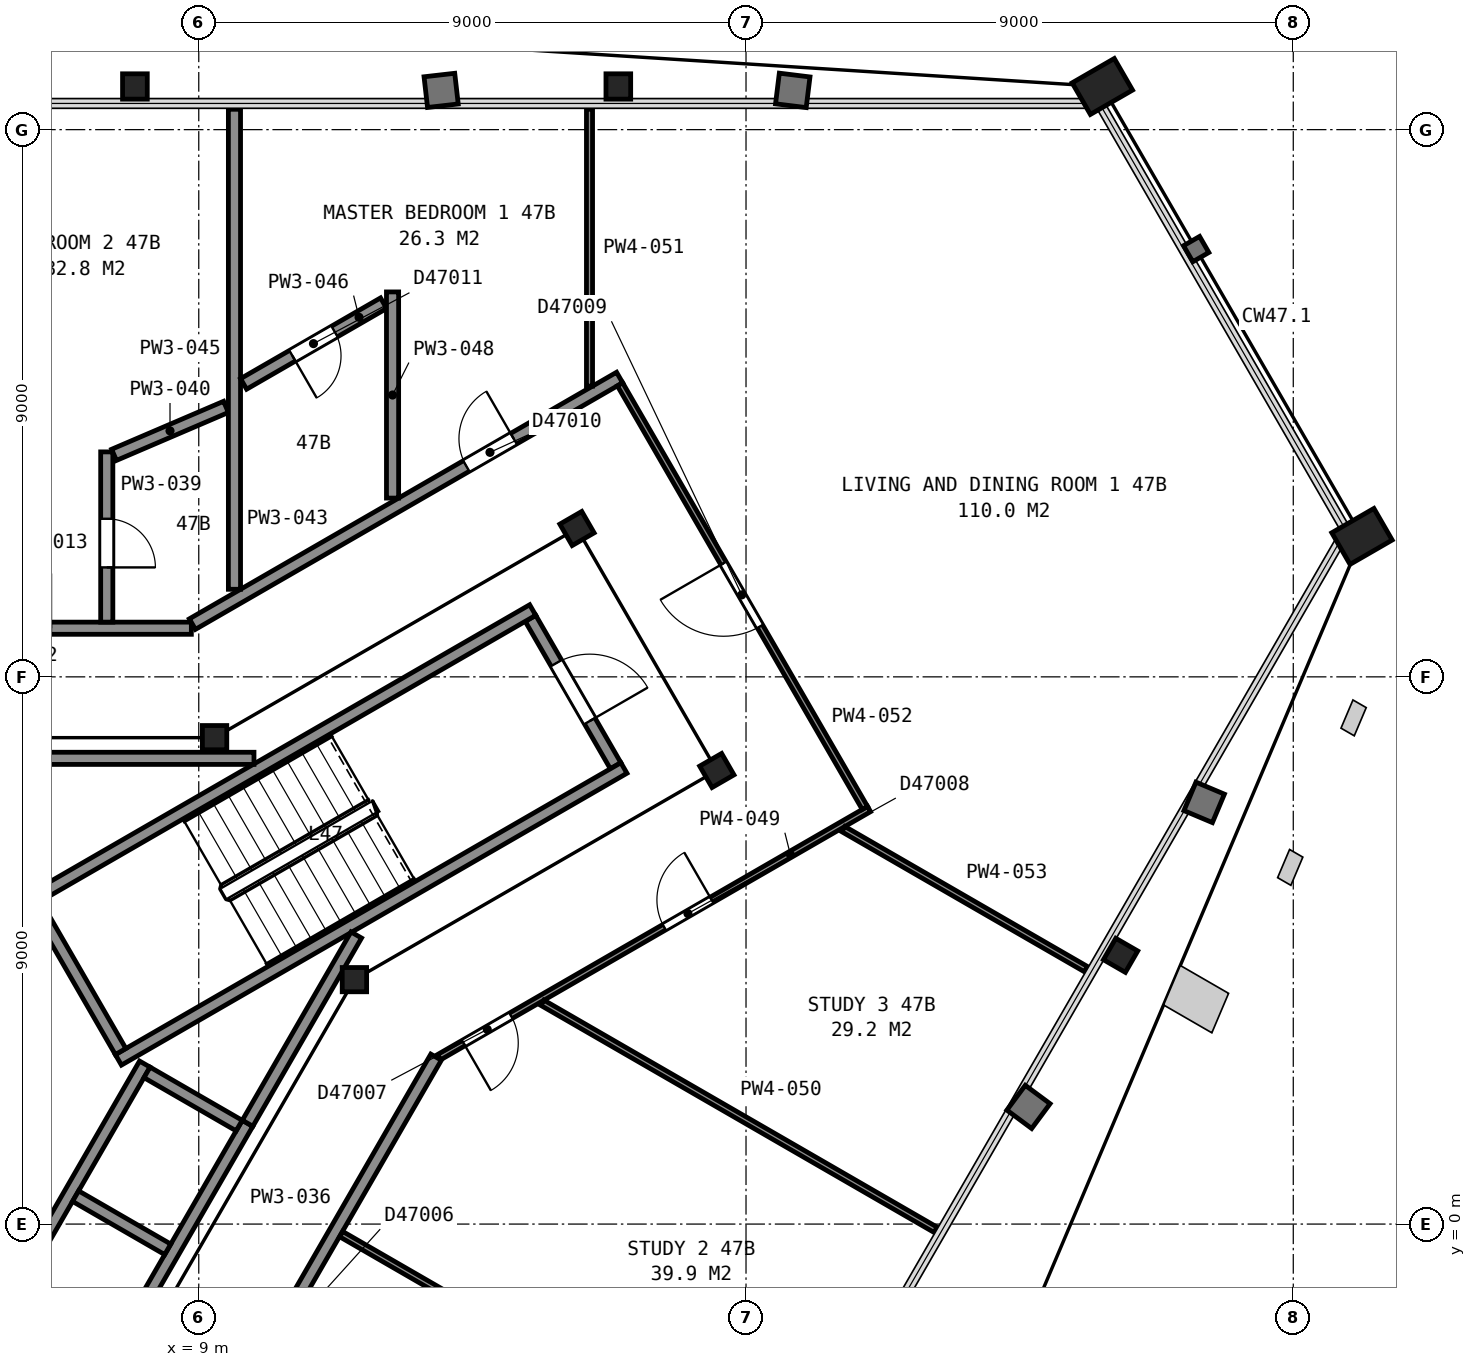
"""IFC4 building model, lengths in metres.
Left out: names, types, materials, properties, quantities, classifications, styles, units other than length and angle.
Written with IfcOpenShell. Run it as: python <this file> out.ifc"""

import sys

from ifc_helpers import new_model, si_unit, direction, frame, frame_2d, origin, origin_2d, place, context, subcontext, project, spatial, rectangle, hollow_rectangle, i_section, extrude, element, fill, save


model = new_model("IFC4")
c1 = context("Model", 3, precision=1e-05, world=origin(), true_north=direction((0.0, 1.0)))
c2 = subcontext(c1, "Body", "Model", "MODEL_VIEW")
j1 = project(units=[si_unit("LENGTHUNIT", "METRE"), si_unit("PLANEANGLEUNIT", "RADIAN")], contexts=[c1])
p1 = place(None, origin())
s1 = spatial("IfcSite", under=j1, at=p1, CompositionType="ELEMENT")
p2 = place(p1, origin())
s2 = spatial("IfcBuilding", under=s1, at=p2, CompositionType="ELEMENT")
p3 = place(p2, frame((0.0, 0.0, 189.5)))
s3 = spatial("IfcBuildingStorey", under=s2, at=p3, CompositionType="ELEMENT", Elevation=189.5)
p4 = place(p3, frame((23.86, 18.71, 0.065), z_axis=(0.0, 0.0, 1.0), x_axis=(0.5, -0.866025403784, 0.0)))
e1 = element("IfcColumn", 1, at=p4, inside=s3, PredefinedType="COLUMN", context=c2, shape_type="SweptSolid", body=[
    extrude(hollow_rectangle(XDim=0.6, YDim=0.8, WallThickness=0.05, at=origin_2d()), origin(), (0.0, 0.0, 1.0), 3.635),
])
p5 = place(p3, frame((15.9, 18.71, 0.04), z_axis=(0.0, 0.0, 1.0), x_axis=(1.0, 0.0, 0.0)))
e2 = element("IfcColumn", 2, at=p5, inside=s3, PredefinedType="COLUMN", context=c2, shape_type="SweptSolid", body=[
    extrude(i_section(OverallWidth=0.406, OverallDepth=0.417, WebThickness=0.03, FlangeThickness=0.048, FilletRadius=0.015, at=origin_2d()), origin(), (0.0, 0.0, 1.0), 3.66),
])
p6 = place(p3, frame((7.95, 18.71, 0.035), z_axis=(0.0, 0.0, 1.0), x_axis=(1.0, 0.0, 0.0)))
e3 = element("IfcColumn", 3, at=p6, inside=s3, PredefinedType="COLUMN", context=c2, shape_type="SweptSolid", body=[
    extrude(i_section(OverallWidth=0.406, OverallDepth=0.417, WebThickness=0.03, FlangeThickness=0.048, FilletRadius=0.015, at=origin_2d()), origin(), (0.0, 0.0, 1.0), 3.665),
])
p7 = place(p3, frame((24.16, 4.42, 0.04), z_axis=(0.0, 0.0, 1.0), x_axis=(-0.5, -0.866025403784, 0.0)))
e4 = element("IfcColumn", 4, at=p7, inside=s3, PredefinedType="COLUMN", context=c2, shape_type="SweptSolid", body=[
    extrude(i_section(OverallWidth=0.406, OverallDepth=0.417, WebThickness=0.03, FlangeThickness=0.048, FilletRadius=0.015, at=origin_2d()), origin(), (0.0, 0.0, 1.0), 3.66),
])
p8 = place(p3, frame((28.13, 11.31, 0.065), z_axis=(0.0, 0.0, 1.0), x_axis=(0.5, -0.866025403784, 0.0)))
e5 = element("IfcColumn", 5, at=p8, inside=s3, PredefinedType="COLUMN", context=c2, shape_type="SweptSolid", body=[
    extrude(hollow_rectangle(XDim=0.6, YDim=0.8, WallThickness=0.05, at=origin_2d()), origin(), (0.0, 0.0, 1.0), 3.635),
])
p9 = place(p3, frame((11.56, 4.02, 0.0), z_axis=(0.0, 0.0, 1.0), x_axis=(1.0, 0.0, 0.0)))
e6 = element("IfcColumn", 6, at=p9, inside=s3, PredefinedType="COLUMN", context=c2, shape_type="SweptSolid", body=[
    extrude(i_section(OverallWidth=0.401, OverallDepth=0.399, WebThickness=0.025, FlangeThickness=0.04, FilletRadius=0.015, at=origin_2d()), origin(), (0.0, 0.0, 1.0), 3.7),
])
for number, where, z_axis, x_axis in (
    (7, (17.52, 7.46, 0.0), (0.0, 0.0, 1.0), (0.5, -0.866, 0.0)),
    (8, (15.22, 11.44, 0.0), (0.0, 0.0, 1.0), (0.5, -0.866, 0.0)),
):
    element("IfcColumn", number, at=place(p3, frame(where, z_axis=z_axis, x_axis=x_axis)), inside=s3, PredefinedType="COLUMN", context=c2, shape_type="SweptSolid", body=[
        extrude(i_section(OverallWidth=0.406, OverallDepth=0.417, WebThickness=0.03, FlangeThickness=0.048, FilletRadius=0.015, at=origin_2d()), origin(), (0.0, 0.0, 1.0), 3.7),
    ])
p10 = place(p3, frame((9.26, 8.0, 0.0), z_axis=(0.0, 0.0, 1.0), x_axis=(1.0, 0.0, 0.0)))
e9 = element("IfcColumn", 9, at=p10, inside=s3, PredefinedType="COLUMN", context=c2, shape_type="SweptSolid", body=[
    extrude(i_section(OverallWidth=0.401, OverallDepth=0.399, WebThickness=0.025, FlangeThickness=0.04, FilletRadius=0.015, at=origin_2d()), origin(), (0.0, 0.0, 1.0), 3.7),
])
p11 = place(p3, frame((15.855, 7.538, 0.0), z_axis=(0.0, 0.0, 1.0), x_axis=(-0.500049511043, 0.865996816683, 0.0)))
e10 = element("IfcWall", 10, at=p11, inside=s3, PredefinedType="PARTITIONING", context=c2, shape_type="SweptSolid", body=[
    extrude(rectangle(XDim=2.8, YDim=0.2, at=frame_2d((1.4, 0.0))), origin(), (0.0, 0.0, 1.0), 3.45),
])
p12 = place(p11, frame((0.85, 0.0, 0.0)))
e11 = element("IfcOpeningElement", 11, at=p12, cuts=e10, PredefinedType="OPENING", context=c2, shape_type="SweptSolid", body=[
    extrude(rectangle(XDim=1.1, YDim=2.1, at=frame_2d((0.55, 1.05))), frame((0.0, 0.11, 0.0), z_axis=(0.0, -1.0, 0.0), x_axis=(1.0, 0.0, 0.0)), (0.0, 0.0, 1.0), 0.22),
])
for number, where, z_axis, x_axis in (
    (12, (6.178, 5.299, 0.0), (0.0, 0.0, 1.0), (0.866, 0.5, 0.0)),
    (13, (7.678, 2.701, 0.0), (0.0, 0.0, 1.0), (0.866, 0.5, 0.0)),
):
    element("IfcWall", number, at=place(p3, frame(where, z_axis=z_axis, x_axis=x_axis)), inside=s3, PredefinedType="PARTITIONING", context=c2, shape_type="SweptSolid", body=[
        extrude(rectangle(XDim=9.6, YDim=0.2, at=frame_2d((4.8, 0.0))), origin(), (0.0, 0.0, 1.0), 3.45),
    ])
p13 = place(p3, frame((7.715, 2.838, 0.0), z_axis=(0.0, 0.0, 1.0), x_axis=(-0.500049511043, 0.865996816683, 0.0)))
e14 = element("IfcWall", 14, at=p13, inside=s3, PredefinedType="PARTITIONING", context=c2, shape_type="SweptSolid", body=[
    extrude(rectangle(XDim=2.8, YDim=0.2, at=frame_2d((1.4, 0.0))), origin(), (0.0, 0.0, 1.0), 3.45),
])
p14 = place(p3, frame((7.351, -2.587, 0.0), z_axis=(0.0, 0.0, 1.0), x_axis=(0.500002801628, 0.866023786258, 0.0)))
e15 = element("IfcWall", 15, at=p14, inside=s3, PredefinedType="PARTITIONING", context=c2, shape_type="SweptSolid", body=[
    extrude(rectangle(XDim=4.9, YDim=0.2, at=frame_2d((2.45, 0.0))), origin(), (0.0, 0.0, 1.0), 3.7),
])
p15 = place(p3, frame((5.663, -1.612, 0.0), z_axis=(0.0, 0.0, 1.0), x_axis=(0.49998122708, 0.866036242063, 0.0)))
e16 = element("IfcWall", 16, at=p15, inside=s3, PredefinedType="PARTITIONING", context=c2, shape_type="SweptSolid", body=[
    extrude(rectangle(XDim=4.9, YDim=0.2, at=frame_2d((2.45, 0.0))), origin(), (0.0, 0.0, 1.0), 3.7),
])
p16 = place(p3, frame((9.665, 1.62, 0.0), z_axis=(0.0, 0.0, 1.0), x_axis=(-0.866002029911, 0.500040482552, 0.0)))
e17 = element("IfcWall", 17, at=p16, inside=s3, PredefinedType="PARTITIONING", context=c2, shape_type="SweptSolid", body=[
    extrude(rectangle(XDim=1.75, YDim=0.2, at=frame_2d((0.875, 0.0))), origin(), (0.0, 0.0, 1.0), 3.7),
])
p17 = place(p3, frame((8.49, -0.416, 0.0), z_axis=(0.0, 0.0, 1.0), x_axis=(-0.866036909293, 0.499980071345, 0.0)))
e18 = element("IfcWall", 18, at=p17, inside=s3, PredefinedType="PARTITIONING", context=c2, shape_type="SweptSolid", body=[
    extrude(rectangle(XDim=1.75, YDim=0.2, at=frame_2d((0.875, 0.0))), origin(), (0.0, 0.0, 1.0), 3.7),
])
p18 = place(p3, frame((-3.933, 7.66, 0.0), z_axis=(0.0, 0.0, 1.0), x_axis=(1.0, 0.0, 0.0)))
e19 = element("IfcWall", 19, at=p18, inside=s3, PredefinedType="PARTITIONING", context=c2, shape_type="SweptSolid", body=[
    extrude(rectangle(XDim=13.841, YDim=0.2, at=frame_2d((6.92, 0.0))), origin(), (0.0, 0.0, 1.0), 3.45),
])
p19 = place(p3, frame((9.803, 1.658, 0.0), z_axis=(0.0, 0.0, 1.0), x_axis=(0.499943114462, 0.866058244174, 0.0)))
e20 = element("IfcWall", 20, at=p19, inside=s3, PredefinedType="PARTITIONING", context=c2, shape_type="SweptSolid", body=[
    extrude(rectangle(XDim=3.576, YDim=0.2, at=frame_2d((1.788, 0.0))), origin(), (0.0, 0.0, 1.0), 3.45),
])
p20 = place(p3, frame((-8.828, 9.8, 0.0), z_axis=(0.0, 0.0, 1.0), x_axis=(1.0, 0.0, 0.0)))
e21 = element("IfcWall", 21, at=p20, inside=s3, PredefinedType="PARTITIONING", context=c2, shape_type="SweptSolid", body=[
    extrude(rectangle(XDim=17.706, YDim=0.2, at=frame_2d((8.853, 0.0))), origin(), (0.0, 0.0, 1.0), 2.713),
])
p21 = place(p20, frame((14.498, 0.0, 0.0)))
e22 = element("IfcOpeningElement", 22, at=p21, cuts=e21, PredefinedType="OPENING", context=c2, shape_type="SweptSolid", body=[
    extrude(rectangle(XDim=0.9, YDim=2.1, at=frame_2d((0.45, 1.05))), frame((0.0, 0.11, 0.0), z_axis=(0.0, -1.0, 0.0), x_axis=(1.0, 0.0, 0.0)), (0.0, 0.0, 1.0), 0.22),
])
p22 = place(p20, frame((10.919, 0.0, 0.0)))
e23 = element("IfcOpeningElement", 23, at=p22, cuts=e21, PredefinedType="OPENING", context=c2, shape_type="SweptSolid", body=[
    extrude(rectangle(XDim=0.9, YDim=2.1, at=frame_2d((0.45, 1.05))), frame((0.0, 0.11, 0.0), z_axis=(0.0, -1.0, 0.0), x_axis=(1.0, 0.0, 0.0)), (0.0, 0.0, 1.0), 0.22),
])
p23 = place(p20, frame((6.113, 0.0, 0.0)))
e24 = element("IfcOpeningElement", 24, at=p23, cuts=e21, PredefinedType="OPENING", context=c2, shape_type="SweptSolid", body=[
    extrude(rectangle(XDim=0.9, YDim=2.1, at=frame_2d((0.45, 1.05))), frame((0.0, 0.11, 0.0), z_axis=(0.0, -1.0, 0.0), x_axis=(1.0, 0.0, 0.0)), (0.0, 0.0, 1.0), 0.22),
])
p24 = place(p3, frame((12.903, 2.745, 0.0), z_axis=(0.0, 0.0, 1.0), x_axis=(-0.499992063946, -0.866029985619, 0.0)))
e25 = element("IfcWall", 25, at=p24, inside=s3, PredefinedType="PARTITIONING", context=c2, shape_type="SweptSolid", body=[
    extrude(rectangle(XDim=12.907, YDim=0.2, at=frame_2d((6.454, 0.0))), origin(), (0.0, 0.0, 1.0), 2.713),
])
p25 = place(p24, frame((9.032, 0.0, 0.0)))
e26 = element("IfcOpeningElement", 26, at=p25, cuts=e25, PredefinedType="OPENING", context=c2, shape_type="SweptSolid", body=[
    extrude(rectangle(XDim=0.9, YDim=2.1, at=frame_2d((0.45, 1.05))), frame((0.0, 0.11, 0.0), z_axis=(0.0, -1.0, 0.0), x_axis=(1.0, 0.0, 0.0)), (0.0, 0.0, 1.0), 0.22),
])
p26 = place(p24, frame((5.349, 0.0, 0.0)))
e27 = element("IfcOpeningElement", 27, at=p26, cuts=e25, PredefinedType="OPENING", context=c2, shape_type="SweptSolid", body=[
    extrude(rectangle(XDim=0.9, YDim=2.1, at=frame_2d((0.45, 1.05))), frame((0.0, 0.11, 0.0), z_axis=(0.0, -1.0, 0.0), x_axis=(1.0, 0.0, 0.0)), (0.0, 0.0, 1.0), 0.22),
])
p27 = place(p3, frame((7.487, 12.7, 0.0), z_axis=(0.0, 0.0, 1.0), x_axis=(0.0, -1.0, 0.0)))
e28 = element("IfcWall", 28, at=p27, inside=s3, PredefinedType="PARTITIONING", context=c2, shape_type="SweptSolid", body=[
    extrude(rectangle(XDim=2.8, YDim=0.2, at=frame_2d((1.4, 0.0))), origin(), (0.0, 0.0, 1.0), 2.713),
])
p28 = place(p27, frame((1.1, 0.0, 0.0)))
e29 = element("IfcOpeningElement", 29, at=p28, cuts=e28, PredefinedType="OPENING", context=c2, shape_type="SweptSolid", body=[
    extrude(rectangle(XDim=0.8, YDim=2.1, at=frame_2d((0.4, 1.05))), frame((0.0, 0.11, 0.0), z_axis=(0.0, -1.0, 0.0), x_axis=(1.0, 0.0, 0.0)), (0.0, 0.0, 1.0), 0.22),
])
p29 = place(p3, frame((7.606, 12.651, 0.0), z_axis=(0.0, 0.0, 1.0), x_axis=(0.919138725477, 0.39393400885, 0.0)))
e30 = element("IfcWall", 30, at=p29, inside=s3, PredefinedType="PARTITIONING", context=c2, shape_type="SweptSolid", body=[
    extrude(rectangle(XDim=2.003, YDim=0.2, at=frame_2d((1.001, 0.0))), origin(), (0.0, 0.0, 1.0), 2.713),
])
p30 = place(p3, frame((8.895, 9.867, 0.0), z_axis=(0.0, 0.0, 1.0), x_axis=(0.866079355551, 0.499906541154, 0.0)))
e31 = element("IfcWall", 31, at=p30, inside=s3, PredefinedType="PARTITIONING", context=c2, shape_type="SweptSolid", body=[
    extrude(rectangle(XDim=8.113, YDim=0.2, at=frame_2d((4.056, 0.0))), origin(), (0.0, 0.0, 1.0), 2.713),
])
p31 = place(p30, frame((5.201, 0.0, 0.0)))
e32 = element("IfcOpeningElement", 32, at=p31, cuts=e31, PredefinedType="OPENING", context=c2, shape_type="SweptSolid", body=[
    extrude(rectangle(XDim=0.9, YDim=2.1, at=frame_2d((0.45, 1.05))), frame((0.0, 0.11, 0.0), z_axis=(0.0, -1.0, 0.0), x_axis=(1.0, 0.0, 0.0)), (0.0, 0.0, 1.0), 0.22),
])
p32 = place(p3, frame((9.587, 10.44, 0.0), z_axis=(0.0, 0.0, 1.0), x_axis=(0.0, 1.0, 0.0)))
e33 = element("IfcWall", 33, at=p32, inside=s3, PredefinedType="PARTITIONING", context=c2, shape_type="SweptSolid", body=[
    extrude(rectangle(XDim=7.895, YDim=0.2, at=frame_2d((3.947, 0.0))), origin(), (0.0, 0.0, 1.0), 2.713),
])
p33 = place(p3, frame((12.04, 15.146, 0.0), z_axis=(0.0, 0.0, 1.0), x_axis=(-0.866206990114, -0.499685351273, 0.0)))
e34 = element("IfcWall", 34, at=p33, inside=s3, PredefinedType="PARTITIONING", context=c2, shape_type="SweptSolid", body=[
    extrude(rectangle(XDim=2.658, YDim=0.2, at=frame_2d((1.329, 0.0))), origin(), (0.0, 0.0, 1.0), 2.713),
])
p34 = place(p33, frame((0.932, 0.0, 0.0)))
e35 = element("IfcOpeningElement", 35, at=p34, cuts=e34, PredefinedType="OPENING", context=c2, shape_type="SweptSolid", body=[
    extrude(rectangle(XDim=0.8, YDim=2.1, at=frame_2d((0.4, 1.05))), frame((0.0, 0.11, 0.0), z_axis=(0.0, -1.0, 0.0), x_axis=(1.0, 0.0, 0.0)), (0.0, 0.0, 1.0), 0.22),
])
p35 = place(p3, frame((11.343, -0.166, 0.0), z_axis=(0.0, 0.0, 1.0), x_axis=(0.866022557401, -0.500004930048, 0.0)))
e36 = element("IfcWall", 36, at=p35, inside=s3, PredefinedType="PARTITIONING", context=c2, shape_type="SweptSolid", body=[
    extrude(rectangle(XDim=8.429, YDim=0.1, at=frame_2d((4.215, 0.0))), origin(), (0.0, 0.0, 1.0), 2.713),
])
p36 = place(p3, frame((12.187, 11.94, 0.0), z_axis=(0.0, 0.0, 1.0), x_axis=(0.0, 1.0, 0.0)))
e37 = element("IfcWall", 37, at=p36, inside=s3, PredefinedType="PARTITIONING", context=c2, shape_type="SweptSolid", body=[
    extrude(rectangle(XDim=3.391, YDim=0.2, at=frame_2d((1.695, 0.0))), origin(), (0.0, 0.0, 1.0), 2.713),
])
p37 = place(p3, frame((20.023, 6.826, 0.0), z_axis=(0.0, 0.0, 1.0), x_axis=(-0.86608949446, -0.499888975259, 0.0)))
e38 = element("IfcWall", 38, at=p37, inside=s3, PredefinedType="PARTITIONING", context=c2, shape_type="SweptSolid", body=[
    extrude(rectangle(XDim=8.165, YDim=0.1, at=frame_2d((4.083, 0.0))), origin(), (0.0, 0.0, 1.0), 2.713),
])
p38 = place(p37, frame((6.8, 0.0, 0.0)))
e39 = element("IfcOpeningElement", 39, at=p38, cuts=e38, PredefinedType="OPENING", context=c2, shape_type="SweptSolid", body=[
    extrude(rectangle(XDim=0.9, YDim=2.1, at=frame_2d((0.45, 1.05))), frame((0.0, 0.06, 0.0), z_axis=(0.0, -1.0, 0.0), x_axis=(1.0, 0.0, 0.0)), (0.0, 0.0, 1.0), 0.12),
])
p39 = place(p37, frame((2.989, 0.0, 0.0)))
e40 = element("IfcOpeningElement", 40, at=p39, cuts=e38, PredefinedType="OPENING", context=c2, shape_type="SweptSolid", body=[
    extrude(rectangle(XDim=0.9, YDim=2.1, at=frame_2d((0.45, 1.05))), frame((0.0, 0.06, 0.0), z_axis=(0.0, -1.0, 0.0), x_axis=(1.0, 0.0, 0.0)), (0.0, 0.0, 1.0), 0.12),
])
p40 = place(p3, frame((14.651, 3.64, 0.0), z_axis=(0.0, 0.0, 1.0), x_axis=(0.866021145342, -0.500007375767, 0.0)))
e41 = element("IfcWall", 41, at=p40, inside=s3, PredefinedType="PARTITIONING", context=c2, shape_type="SweptSolid", body=[
    extrude(rectangle(XDim=7.467, YDim=0.1, at=frame_2d((3.733, 0.0))), origin(), (0.0, 0.0, 1.0), 2.713),
])
p41 = place(p3, frame((15.426, 13.781, 0.0), z_axis=(0.0, 0.0, 1.0), x_axis=(0.0, 1.0, 0.0)))
e42 = element("IfcWall", 42, at=p41, inside=s3, PredefinedType="PARTITIONING", context=c2, shape_type="SweptSolid", body=[
    extrude(rectangle(XDim=4.554, YDim=0.1, at=frame_2d((2.277, 0.0))), origin(), (0.0, 0.0, 1.0), 2.713),
])
p42 = place(p3, frame((15.928, 13.812, 0.0), z_axis=(0.0, 0.0, 1.0), x_axis=(0.500422653123, -0.865781247337, 0.0)))
e43 = element("IfcWall", 43, at=p42, inside=s3, PredefinedType="PARTITIONING", context=c2, shape_type="SweptSolid", body=[
    extrude(rectangle(XDim=8.047, YDim=0.1, at=frame_2d((4.024, 0.0))), origin(), (0.0, 0.0, 1.0), 2.713),
])
p43 = place(p42, frame((3.4, 0.0, 0.0)))
e44 = element("IfcOpeningElement", 44, at=p43, cuts=e43, PredefinedType="OPENING", context=c2, shape_type="SweptSolid", body=[
    extrude(rectangle(XDim=1.2, YDim=2.1, at=frame_2d((0.6, 1.05))), frame((0.0, 0.06, 0.0), z_axis=(0.0, -1.0, 0.0), x_axis=(1.0, 0.0, 0.0)), (0.0, 0.0, 1.0), 0.12),
])
p44 = place(p3, frame((19.601, 6.496, 0.0), z_axis=(0.0, 0.0, 1.0), x_axis=(0.866056775574, -0.499945658529, 0.0)))
e45 = element("IfcWall", 45, at=p44, inside=s3, PredefinedType="PARTITIONING", context=c2, shape_type="SweptSolid", body=[
    extrude(rectangle(XDim=4.608, YDim=0.1, at=frame_2d((2.304, 0.0))), origin(), (0.0, 0.0, 1.0), 2.713),
])
p45 = place(p12, origin())
e46 = element("IfcDoor", 46, at=p45, inside=s3, OperationType="SINGLE_SWING_LEFT", PredefinedType="DOOR", context=c2, shape_type="SweptSolid", body=[
    extrude(rectangle(XDim=1.1, YDim=2.1, at=frame_2d((0.55, 1.05))), frame((0.0, 0.025, 0.0), z_axis=(0.0, -1.0, 0.0), x_axis=(1.0, 0.0, 0.0)), (0.0, 0.0, 1.0), 0.05),
])
fill(e11, e46)
p46 = place(p28, origin())
e47 = element("IfcDoor", 47, at=p46, inside=s3, OperationType="SINGLE_SWING_RIGHT", PredefinedType="DOOR", context=c2, shape_type="SweptSolid", body=[
    extrude(rectangle(XDim=0.8, YDim=2.1, at=frame_2d((0.4, 1.05))), frame((0.0, 0.025, 0.0), z_axis=(0.0, -1.0, 0.0), x_axis=(1.0, 0.0, 0.0)), (0.0, 0.0, 1.0), 0.05),
])
fill(e29, e47)
p47 = place(p31, origin())
e48 = element("IfcDoor", 48, at=p47, inside=s3, OperationType="SINGLE_SWING_RIGHT", PredefinedType="DOOR", context=c2, shape_type="SweptSolid", body=[
    extrude(rectangle(XDim=0.9, YDim=2.1, at=frame_2d((0.45, 1.05))), frame((0.0, 0.025, 0.0), z_axis=(0.0, -1.0, 0.0), x_axis=(1.0, 0.0, 0.0)), (0.0, 0.0, 1.0), 0.05),
])
fill(e32, e48)
p48 = place(p34, origin())
e49 = element("IfcDoor", 49, at=p48, inside=s3, OperationType="SINGLE_SWING_RIGHT", PredefinedType="DOOR", context=c2, shape_type="SweptSolid", body=[
    extrude(rectangle(XDim=0.8, YDim=2.1, at=frame_2d((0.4, 1.05))), frame((0.0, 0.025, 0.0), z_axis=(0.0, -1.0, 0.0), x_axis=(1.0, 0.0, 0.0)), (0.0, 0.0, 1.0), 0.05),
])
fill(e35, e49)
p49 = place(p38, origin())
e50 = element("IfcDoor", 50, at=p49, inside=s3, OperationType="SINGLE_SWING_RIGHT", PredefinedType="DOOR", context=c2, shape_type="SweptSolid", body=[
    extrude(rectangle(XDim=0.9, YDim=2.1, at=frame_2d((0.45, 1.05))), frame((0.0, 0.025, 0.0), z_axis=(0.0, -1.0, 0.0), x_axis=(1.0, 0.0, 0.0)), (0.0, 0.0, 1.0), 0.05),
])
fill(e39, e50)
p50 = place(p39, origin())
e51 = element("IfcDoor", 51, at=p50, inside=s3, OperationType="SINGLE_SWING_LEFT", PredefinedType="DOOR", context=c2, shape_type="SweptSolid", body=[
    extrude(rectangle(XDim=0.9, YDim=2.1, at=frame_2d((0.45, 1.05))), frame((0.0, 0.025, 0.0), z_axis=(0.0, -1.0, 0.0), x_axis=(1.0, 0.0, 0.0)), (0.0, 0.0, 1.0), 0.05),
])
fill(e40, e51)
p51 = place(p43, origin())
e52 = element("IfcDoor", 52, at=p51, inside=s3, OperationType="SINGLE_SWING_LEFT", PredefinedType="DOOR", context=c2, shape_type="SweptSolid", body=[
    extrude(rectangle(XDim=1.2, YDim=2.1, at=frame_2d((0.6, 1.05))), frame((0.0, 0.025, 0.0), z_axis=(0.0, -1.0, 0.0), x_axis=(1.0, 0.0, 0.0)), (0.0, 0.0, 1.0), 0.05),
])
fill(e44, e52)
save(model, sys.argv[1])
